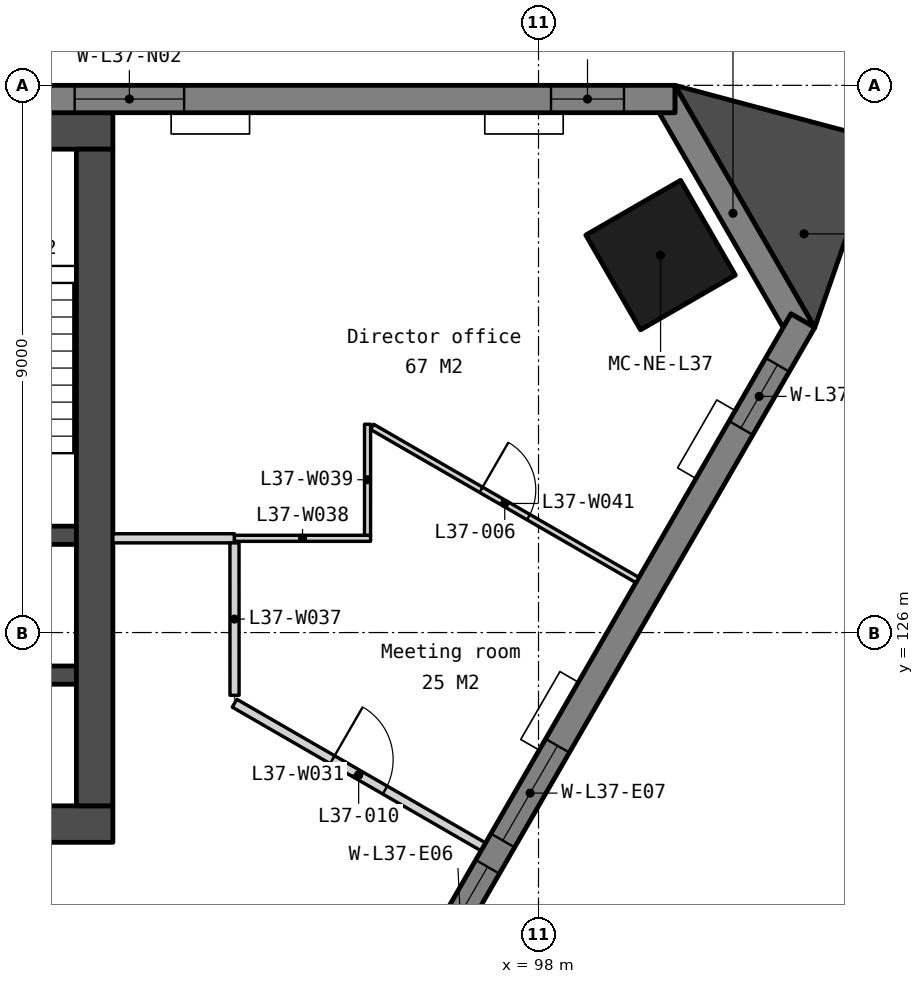
"""IFC4 building model, lengths in metres.
Left out: names, types, materials, properties, quantities, classifications, styles, units other than length and angle.
Written with IfcOpenShell. Run it as: python <this file> out.ifc"""

import sys

from ifc_helpers import new_model, si_unit, direction, frame, frame_2d, origin, origin_2d, place, context, subcontext, project, spatial, polyline, rectangle, outline, extrude, element, fill, save


model = new_model("IFC4")
c1 = context("Model", 3, precision=1e-05, world=origin(), true_north=direction((0.0, 1.0)))
c2 = subcontext(c1, "Body", "Model", "MODEL_VIEW")
j1 = project(units=[si_unit("LENGTHUNIT", "METRE"), si_unit("PLANEANGLEUNIT", "RADIAN")], contexts=[c1])
p1 = place(None, origin())
s1 = spatial("IfcSite", under=j1, at=p1, CompositionType="ELEMENT")
p2 = place(p1, origin())
s2 = spatial("IfcBuilding", under=s1, at=p2, CompositionType="ELEMENT")
p3 = place(p2, frame((0.0, 0.0, 148.1)))
s3 = spatial("IfcBuildingStorey", under=s2, at=p3, CompositionType="ELEMENT", Elevation=148.1)
p4 = place(p3, frame((100.007, 132.208, 0.0), z_axis=(0.0, 0.0, 1.0), x_axis=(-0.5, 0.866025403784, 0.0)))
e1 = element("IfcColumn", 1, at=p4, inside=s3, PredefinedType="COLUMN", context=c2, shape_type="SweptSolid", body=[
    extrude(rectangle(XDim=1.8, YDim=1.8, at=origin_2d()), origin(), (0.0, 0.0, 1.0), 3.9),
])
p5 = place(p3, frame((69.0, 134.25, 0.0), z_axis=(0.0, 0.0, 1.0), x_axis=(1.0, 0.0, 0.0)))
e2 = element("IfcWall", 2, at=p5, inside=s3, PredefinedType="SOLIDWALL", context=c2, shape_type="SweptSolid", body=[
    extrude(rectangle(XDim=22.0, YDim=0.6, at=frame_2d((11.0, 0.0))), origin(), (0.0, 0.0, 1.0), 3.75),
])
p6 = place(p3, frame((69.0, 122.85, 0.0), z_axis=(0.0, 0.0, 1.0), x_axis=(1.0, 0.0, 0.0)))
e3 = element("IfcWall", 3, at=p6, inside=s3, PredefinedType="SOLIDWALL", context=c2, shape_type="SweptSolid", body=[
    extrude(rectangle(XDim=22.0, YDim=0.6, at=frame_2d((11.0, 0.0))), origin(), (0.0, 0.0, 1.0), 3.75),
])
p7 = place(p6, frame((16.375, 0.0, 0.0)))
e4 = element("IfcOpeningElement", 4, at=p7, cuts=e3, PredefinedType="OPENING", context=c2, shape_type="SweptSolid", body=[
    extrude(rectangle(XDim=1.8, YDim=2.1, at=frame_2d((0.9, 1.05))), frame((0.0, 0.31, 0.0), z_axis=(0.0, -1.0, 0.0), x_axis=(1.0, 0.0, 0.0)), (0.0, 0.0, 1.0), 0.62),
])
p8 = place(p6, frame((3.825, 0.0, 0.0)))
e5 = element("IfcOpeningElement", 5, at=p8, cuts=e3, PredefinedType="OPENING", context=c2, shape_type="SweptSolid", body=[
    extrude(rectangle(XDim=1.8, YDim=2.1, at=frame_2d((0.9, 1.05))), frame((0.0, 0.31, 0.0), z_axis=(0.0, -1.0, 0.0), x_axis=(1.0, 0.0, 0.0)), (0.0, 0.0, 1.0), 0.62),
])
p9 = place(p6, frame((12.85, 0.0, 0.0)))
e6 = element("IfcOpeningElement", 6, at=p9, cuts=e3, PredefinedType="OPENING", context=c2, shape_type="SweptSolid", body=[
    extrude(rectangle(XDim=1.5, YDim=2.1, at=frame_2d((0.75, 1.05))), frame((0.0, 0.31, 0.0), z_axis=(0.0, -1.0, 0.0), x_axis=(1.0, 0.0, 0.0)), (0.0, 0.0, 1.0), 0.62),
])
for number, where, z_axis, x_axis in (
    (7, (87.85, 127.6, 0.0), (0.0, 0.0, 1.0), (1.0, 0.0, 0.0)),
    (8, (87.85, 125.3, 0.0), (0.0, 0.0, 1.0), (1.0, 0.0, 0.0)),
):
    element("IfcWall", number, at=place(p3, frame(where, z_axis=z_axis, x_axis=x_axis)), inside=s3, PredefinedType="SOLIDWALL", context=c2, shape_type="SweptSolid", body=[
        extrude(rectangle(XDim=2.55, YDim=0.3, at=frame_2d((1.275, 0.0))), origin(), (0.0, 0.0, 1.0), 3.75),
    ])
p10 = place(p3, frame((90.7, 133.95, 0.0), z_axis=(0.0, 0.0, 1.0), x_axis=(0.0, -1.0, 0.0)))
e9 = element("IfcWall", 9, at=p10, inside=s3, PredefinedType="SOLIDWALL", context=c2, shape_type="SweptSolid", body=[
    extrude(rectangle(XDim=10.8, YDim=0.6, at=frame_2d((5.4, 0.0))), origin(), (0.0, 0.0, 1.0), 3.75),
])
p11 = place(p3, frame((0.0, 0.0, -0.15)))
e10 = element("IfcWall", 10, at=p11, inside=s3, PredefinedType="SOLIDWALL", context=c2, shape_type="SweptSolid", body=[
    extrude(outline(polyline([(102.543, 131.016), (102.153, 131.241), (102.023, 131.016), (99.983, 134.55), (100.243, 134.55), (100.243, 135.0), (102.543, 131.016)])), origin(), (0.0, 0.0, 1.0), 3.9),
])
p12 = place(p3, frame((100.243, 134.775, -0.15), z_axis=(0.0, 0.0, 1.0), x_axis=(-1.0, 0.0, 0.0)))
e11 = element("IfcWall", 11, at=p12, inside=s3, PredefinedType="SOLIDWALL", context=c2, shape_type="SweptSolid", body=[
    extrude(outline(polyline([(40.486, 0.0), (40.486, 3.9), (0.0, 3.9), (0.0, 0.0), (40.486, 0.0)])), frame((0.0, 0.225, 0.0), z_axis=(0.0, -1.0, 0.0), x_axis=(1.0, 0.0, 0.0)), (0.0, 0.0, 1.0), 0.45),
])
p13 = place(p12, frame((0.837, 0.0, 0.95)))
e12 = element("IfcOpeningElement", 12, at=p13, cuts=e11, PredefinedType="OPENING", context=c2, shape_type="SweptSolid", body=[
    extrude(rectangle(XDim=1.2, YDim=2.2, at=frame_2d((0.6, 1.1))), frame((0.0, 0.235, 0.0), z_axis=(0.0, -1.0, 0.0), x_axis=(1.0, 0.0, 0.0)), (0.0, 0.0, 1.0), 0.47),
])
p14 = place(p12, frame((8.072, 0.0, 0.95)))
e13 = element("IfcOpeningElement", 13, at=p14, cuts=e11, PredefinedType="OPENING", context=c2, shape_type="SweptSolid", body=[
    extrude(rectangle(XDim=1.8, YDim=2.2, at=frame_2d((0.9, 1.1))), frame((0.0, 0.235, 0.0), z_axis=(0.0, -1.0, 0.0), x_axis=(1.0, 0.0, 0.0)), (0.0, 0.0, 1.0), 0.47),
])
p15 = place(p12, frame((10.372, 0.0, 0.95)))
e14 = element("IfcOpeningElement", 14, at=p15, cuts=e11, PredefinedType="OPENING", context=c2, shape_type="SweptSolid", body=[
    extrude(rectangle(XDim=1.8, YDim=2.2, at=frame_2d((0.9, 1.1))), frame((0.0, 0.235, 0.0), z_axis=(0.0, -1.0, 0.0), x_axis=(1.0, 0.0, 0.0)), (0.0, 0.0, 1.0), 0.47),
])
p16 = place(p12, frame((18.193, 0.0, 0.95)))
e15 = element("IfcOpeningElement", 15, at=p16, cuts=e11, PredefinedType="OPENING", context=c2, shape_type="SweptSolid", body=[
    extrude(rectangle(XDim=1.8, YDim=2.2, at=frame_2d((0.9, 1.1))), frame((0.0, 0.235, 0.0), z_axis=(0.0, -1.0, 0.0), x_axis=(1.0, 0.0, 0.0)), (0.0, 0.0, 1.0), 0.47),
])
p17 = place(p12, frame((20.493, 0.0, 0.95)))
e16 = element("IfcOpeningElement", 16, at=p17, cuts=e11, PredefinedType="OPENING", context=c2, shape_type="SweptSolid", body=[
    extrude(rectangle(XDim=1.8, YDim=2.2, at=frame_2d((0.9, 1.1))), frame((0.0, 0.235, 0.0), z_axis=(0.0, -1.0, 0.0), x_axis=(1.0, 0.0, 0.0)), (0.0, 0.0, 1.0), 0.47),
])
p18 = place(p12, frame((28.315, 0.0, 0.95)))
e17 = element("IfcOpeningElement", 17, at=p18, cuts=e11, PredefinedType="OPENING", context=c2, shape_type="SweptSolid", body=[
    extrude(rectangle(XDim=1.8, YDim=2.2, at=frame_2d((0.9, 1.1))), frame((0.0, 0.235, 0.0), z_axis=(0.0, -1.0, 0.0), x_axis=(1.0, 0.0, 0.0)), (0.0, 0.0, 1.0), 0.47),
])
p19 = place(p12, frame((30.615, 0.0, 0.95)))
e18 = element("IfcOpeningElement", 18, at=p19, cuts=e11, PredefinedType="OPENING", context=c2, shape_type="SweptSolid", body=[
    extrude(rectangle(XDim=1.8, YDim=2.2, at=frame_2d((0.9, 1.1))), frame((0.0, 0.235, 0.0), z_axis=(0.0, -1.0, 0.0), x_axis=(1.0, 0.0, 0.0)), (0.0, 0.0, 1.0), 0.47),
])
p20 = place(p12, frame((38.449, 0.0, 0.95)))
e19 = element("IfcOpeningElement", 19, at=p20, cuts=e11, PredefinedType="OPENING", context=c2, shape_type="SweptSolid", body=[
    extrude(rectangle(XDim=1.2, YDim=2.2, at=frame_2d((0.6, 1.1))), frame((0.0, 0.235, 0.0), z_axis=(0.0, -1.0, 0.0), x_axis=(1.0, 0.0, 0.0)), (0.0, 0.0, 1.0), 0.47),
])
p21 = place(p3, frame((82.105, 96.067, -0.15), z_axis=(0.0, 0.0, 1.0), x_axis=(0.499997369791, 0.866026922331, 0.0)))
e20 = element("IfcWall", 20, at=p21, inside=s3, PredefinedType="SOLIDWALL", context=c2, shape_type="SweptSolid", body=[
    extrude(outline(polyline([(40.486, 0.0), (40.486, 3.9), (0.0, 3.9), (0.0, 0.0), (40.486, 0.0)])), frame((0.0, 0.225, 0.0), z_axis=(0.0, -1.0, 0.0), x_axis=(1.0, 0.0, 0.0)), (0.0, 0.0, 1.0), 0.45),
])
p22 = place(p21, frame((0.837, 0.0, 0.95)))
e21 = element("IfcOpeningElement", 21, at=p22, cuts=e20, PredefinedType="OPENING", context=c2, shape_type="SweptSolid", body=[
    extrude(rectangle(XDim=1.2, YDim=2.2, at=frame_2d((0.6, 1.1))), frame((0.0, 0.235, 0.0), z_axis=(0.0, -1.0, 0.0), x_axis=(1.0, 0.0, 0.0)), (0.0, 0.0, 1.0), 0.47),
])
p23 = place(p21, frame((8.072, 0.0, 0.95)))
e22 = element("IfcOpeningElement", 22, at=p23, cuts=e20, PredefinedType="OPENING", context=c2, shape_type="SweptSolid", body=[
    extrude(rectangle(XDim=1.8, YDim=2.2, at=frame_2d((0.9, 1.1))), frame((0.0, 0.235, 0.0), z_axis=(0.0, -1.0, 0.0), x_axis=(1.0, 0.0, 0.0)), (0.0, 0.0, 1.0), 0.47),
])
p24 = place(p21, frame((10.372, 0.0, 0.95)))
e23 = element("IfcOpeningElement", 23, at=p24, cuts=e20, PredefinedType="OPENING", context=c2, shape_type="SweptSolid", body=[
    extrude(rectangle(XDim=1.8, YDim=2.2, at=frame_2d((0.9, 1.1))), frame((0.0, 0.235, 0.0), z_axis=(0.0, -1.0, 0.0), x_axis=(1.0, 0.0, 0.0)), (0.0, 0.0, 1.0), 0.47),
])
p25 = place(p21, frame((18.193, 0.0, 0.95)))
e24 = element("IfcOpeningElement", 24, at=p25, cuts=e20, PredefinedType="OPENING", context=c2, shape_type="SweptSolid", body=[
    extrude(rectangle(XDim=1.8, YDim=2.2, at=frame_2d((0.9, 1.1))), frame((0.0, 0.235, 0.0), z_axis=(0.0, -1.0, 0.0), x_axis=(1.0, 0.0, 0.0)), (0.0, 0.0, 1.0), 0.47),
])
p26 = place(p21, frame((20.493, 0.0, 0.95)))
e25 = element("IfcOpeningElement", 25, at=p26, cuts=e20, PredefinedType="OPENING", context=c2, shape_type="SweptSolid", body=[
    extrude(rectangle(XDim=1.8, YDim=2.2, at=frame_2d((0.9, 1.1))), frame((0.0, 0.235, 0.0), z_axis=(0.0, -1.0, 0.0), x_axis=(1.0, 0.0, 0.0)), (0.0, 0.0, 1.0), 0.47),
])
p27 = place(p21, frame((28.315, 0.0, 0.95)))
e26 = element("IfcOpeningElement", 26, at=p27, cuts=e20, PredefinedType="OPENING", context=c2, shape_type="SweptSolid", body=[
    extrude(rectangle(XDim=1.8, YDim=2.2, at=frame_2d((0.9, 1.1))), frame((0.0, 0.235, 0.0), z_axis=(0.0, -1.0, 0.0), x_axis=(1.0, 0.0, 0.0)), (0.0, 0.0, 1.0), 0.47),
])
p28 = place(p21, frame((30.615, 0.0, 0.95)))
e27 = element("IfcOpeningElement", 27, at=p28, cuts=e20, PredefinedType="OPENING", context=c2, shape_type="SweptSolid", body=[
    extrude(rectangle(XDim=1.8, YDim=2.2, at=frame_2d((0.9, 1.1))), frame((0.0, 0.235, 0.0), z_axis=(0.0, -1.0, 0.0), x_axis=(1.0, 0.0, 0.0)), (0.0, 0.0, 1.0), 0.47),
])
p29 = place(p21, frame((38.449, 0.0, 0.95)))
e28 = element("IfcOpeningElement", 28, at=p29, cuts=e20, PredefinedType="OPENING", context=c2, shape_type="SweptSolid", body=[
    extrude(rectangle(XDim=1.2, YDim=2.2, at=frame_2d((0.6, 1.1))), frame((0.0, 0.235, 0.0), z_axis=(0.0, -1.0, 0.0), x_axis=(1.0, 0.0, 0.0)), (0.0, 0.0, 1.0), 0.47),
])
p30 = place(p3, frame((0.0, 0.0, -0.15)))
e29 = element("IfcWall", 29, at=p30, inside=s3, PredefinedType="SOLIDWALL", context=c2, shape_type="SweptSolid", body=[
    extrude(outline(polyline([(102.543, 131.016), (103.62, 134.099), (100.243, 135.0), (102.543, 131.016)])), origin(), (0.0, 0.0, 1.0), 3.9),
])
p31 = place(p3, frame((93.001, 124.838, 0.0), z_axis=(0.0, 0.0, 1.0), x_axis=(0.866016566931, -0.500015305566, 0.0)))
e30 = element("IfcWall", 30, at=p31, inside=s3, PredefinedType="PARTITIONING", context=c2, shape_type="SweptSolid", body=[
    extrude(rectangle(XDim=4.715, YDim=0.15, at=frame_2d((2.357, 0.0))), origin(), (0.0, 0.0, 1.0), 3.75),
])
p32 = place(p31, frame((1.857, 0.0, 0.0)))
e31 = element("IfcOpeningElement", 31, at=p32, cuts=e30, PredefinedType="OPENING", context=c2, shape_type="SweptSolid", body=[
    extrude(rectangle(XDim=1.0, YDim=2.1, at=frame_2d((0.5, 1.05))), frame((0.0, 0.085, 0.0), z_axis=(0.0, -1.0, 0.0), x_axis=(1.0, 0.0, 0.0)), (0.0, 0.0, 1.0), 0.17),
])
p33 = place(p3, frame((91.0, 127.55, 0.0), z_axis=(0.0, 0.0, 1.0), x_axis=(1.0, 0.0, 0.0)))
e32 = element("IfcWall", 32, at=p33, inside=s3, PredefinedType="PARTITIONING", context=c2, shape_type="SweptSolid", body=[
    extrude(rectangle(XDim=2.0, YDim=0.15, at=frame_2d((1.0, 0.0))), origin(), (0.0, 0.0, 1.0), 3.75),
])
p34 = place(p3, frame((93.001, 124.968, 0.0), z_axis=(0.0, 0.0, 1.0), x_axis=(-0.000389521832, 0.999999924136, 0.0)))
e33 = element("IfcWall", 33, at=p34, inside=s3, PredefinedType="PARTITIONING", context=c2, shape_type="SweptSolid", body=[
    extrude(rectangle(XDim=2.507, YDim=0.15, at=frame_2d((1.253, 0.0))), origin(), (0.0, 0.0, 1.0), 3.75),
])
p35 = place(p3, frame((93.0, 127.55, 0.0), z_axis=(0.0, 0.0, 1.0), x_axis=(1.0, 0.0, 0.0)))
e34 = element("IfcWall", 34, at=p35, inside=s3, PredefinedType="PARTITIONING", context=c2, shape_type="SweptSolid", body=[
    extrude(rectangle(XDim=2.238, YDim=0.1, at=frame_2d((1.119, 0.0))), origin(), (0.0, 0.0, 1.0), 3.75),
])
p36 = place(p3, frame((95.188, 127.6, 0.0), z_axis=(0.0, 0.0, 1.0), x_axis=(0.00026741542, 0.999999964244, 0.0)))
e35 = element("IfcWall", 35, at=p36, inside=s3, PredefinedType="PARTITIONING", context=c2, shape_type="SweptSolid", body=[
    extrude(rectangle(XDim=1.826, YDim=0.1, at=frame_2d((0.913, 0.0))), origin(), (0.0, 0.0, 1.0), 3.75),
])
p37 = place(p3, frame((95.264, 129.383, 0.0), z_axis=(0.0, 0.0, 1.0), x_axis=(0.866018519491, -0.500011923756, 0.0)))
e36 = element("IfcWall", 36, at=p37, inside=s3, PredefinedType="PARTITIONING", context=c2, shape_type="SweptSolid", body=[
    extrude(rectangle(XDim=5.038, YDim=0.1, at=frame_2d((2.519, 0.0))), origin(), (0.0, 0.0, 1.0), 3.75),
])
p38 = place(p37, frame((2.069, 0.0, 0.0)))
e37 = element("IfcOpeningElement", 37, at=p38, cuts=e36, PredefinedType="OPENING", context=c2, shape_type="SweptSolid", body=[
    extrude(rectangle(XDim=0.9, YDim=2.1, at=frame_2d((0.45, 1.05))), frame((0.0, 0.06, 0.0), z_axis=(0.0, -1.0, 0.0), x_axis=(1.0, 0.0, 0.0)), (0.0, 0.0, 1.0), 0.12),
])
p39 = place(p13, origin())
e38 = element("IfcWindow", 38, at=p39, inside=s3, PartitioningType="SINGLE_PANEL", PredefinedType="WINDOW", context=c2, shape_type="SweptSolid", body=[
    extrude(rectangle(XDim=1.2, YDim=2.2, at=frame_2d((0.6, 1.1))), frame((0.0, 0.03, 0.0), z_axis=(0.0, -1.0, 0.0), x_axis=(1.0, 0.0, 0.0)), (0.0, 0.0, 1.0), 0.06),
])
fill(e12, e38)
p40 = place(p14, origin())
e39 = element("IfcWindow", 39, at=p40, inside=s3, PartitioningType="SINGLE_PANEL", PredefinedType="WINDOW", context=c2, shape_type="SweptSolid", body=[
    extrude(rectangle(XDim=1.8, YDim=2.2, at=frame_2d((0.9, 1.1))), frame((0.0, 0.03, 0.0), z_axis=(0.0, -1.0, 0.0), x_axis=(1.0, 0.0, 0.0)), (0.0, 0.0, 1.0), 0.06),
])
fill(e13, e39)
p41 = place(p27, origin())
e40 = element("IfcWindow", 40, at=p41, inside=s3, PartitioningType="SINGLE_PANEL", PredefinedType="WINDOW", context=c2, shape_type="SweptSolid", body=[
    extrude(rectangle(XDim=1.8, YDim=2.2, at=frame_2d((0.9, 1.1))), frame((0.0, 0.03, 0.0), z_axis=(0.0, -1.0, 0.0), x_axis=(1.0, 0.0, 0.0)), (0.0, 0.0, 1.0), 0.06),
])
fill(e26, e40)
p42 = place(p28, origin())
e41 = element("IfcWindow", 41, at=p42, inside=s3, PartitioningType="SINGLE_PANEL", PredefinedType="WINDOW", context=c2, shape_type="SweptSolid", body=[
    extrude(rectangle(XDim=1.8, YDim=2.2, at=frame_2d((0.9, 1.1))), frame((0.0, 0.03, 0.0), z_axis=(0.0, -1.0, 0.0), x_axis=(1.0, 0.0, 0.0)), (0.0, 0.0, 1.0), 0.06),
])
fill(e27, e41)
p43 = place(p29, origin())
e42 = element("IfcWindow", 42, at=p43, inside=s3, PartitioningType="SINGLE_PANEL", PredefinedType="WINDOW", context=c2, shape_type="SweptSolid", body=[
    extrude(rectangle(XDim=1.2, YDim=2.2, at=frame_2d((0.6, 1.1))), frame((0.0, 0.03, 0.0), z_axis=(0.0, -1.0, 0.0), x_axis=(1.0, 0.0, 0.0)), (0.0, 0.0, 1.0), 0.06),
])
fill(e28, e42)
p44 = place(p38, origin())
e43 = element("IfcDoor", 43, at=p44, inside=s3, OperationType="SINGLE_SWING_LEFT", PredefinedType="DOOR", context=c2, shape_type="SweptSolid", body=[
    extrude(rectangle(XDim=0.9, YDim=2.1, at=frame_2d((0.45, 1.05))), frame((0.0, 0.025, 0.0), z_axis=(0.0, -1.0, 0.0), x_axis=(1.0, 0.0, 0.0)), (0.0, 0.0, 1.0), 0.05),
])
fill(e37, e43)
p45 = place(p32, origin())
e44 = element("IfcDoor", 44, at=p45, inside=s3, OperationType="SINGLE_SWING_LEFT", PredefinedType="DOOR", context=c2, shape_type="SweptSolid", body=[
    extrude(rectangle(XDim=1.0, YDim=2.1, at=frame_2d((0.5, 1.05))), frame((0.0, 0.025, 0.0), z_axis=(0.0, -1.0, 0.0), x_axis=(1.0, 0.0, 0.0)), (0.0, 0.0, 1.0), 0.05),
])
fill(e31, e44)
save(model, sys.argv[1])
